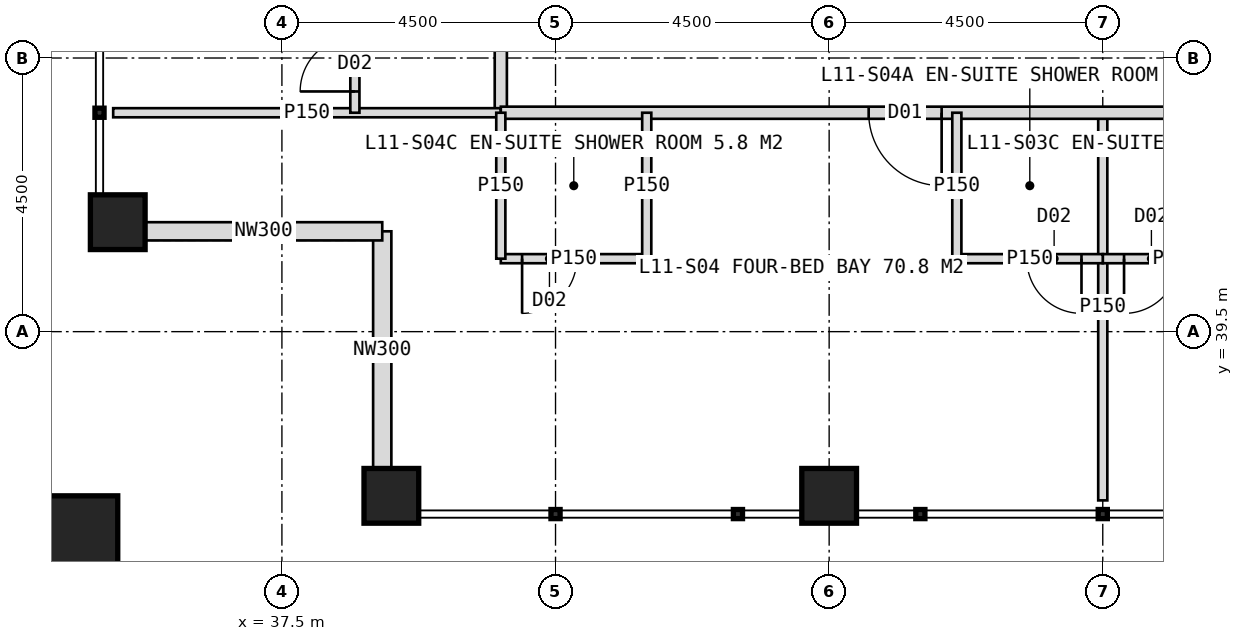
"""IFC4 building model, lengths in metres.
Left out: names, types, materials, properties, quantities, classifications, styles, units other than length and angle.
Written with IfcOpenShell. Run it as: python <this file> out.ifc"""

import sys

from ifc_helpers import new_model, si_unit, direction, frame, frame_2d, origin, origin_2d, place, context, subcontext, project, spatial, rectangle, hollow_rectangle, extrude, element, fill, save


model = new_model("IFC4")
c1 = context("Model", 3, precision=1e-05, world=origin(), true_north=direction((0.0, 1.0)))
c2 = subcontext(c1, "Body", "Model", "MODEL_VIEW")
j1 = project(units=[si_unit("LENGTHUNIT", "METRE"), si_unit("PLANEANGLEUNIT", "RADIAN")], contexts=[c1])
p1 = place(None, origin())
s1 = spatial("IfcSite", under=j1, at=p1, CompositionType="ELEMENT")
p2 = place(p1, origin())
s2 = spatial("IfcBuilding", under=s1, at=p2, CompositionType="ELEMENT")
p3 = place(p2, frame((0.0, 0.0, 51.0)))
s3 = spatial("IfcBuildingStorey", under=s2, at=p3, CompositionType="ELEMENT", Elevation=51.0)
for number, where, z_axis, x_axis in (
    (1, (39.3, 36.8, 0.0), (0.0, 0.0, 1.0), (1.0, 0.0, 0.0)),
    (2, (34.8, 41.3, 0.0), (0.0, 0.0, 1.0), (1.0, 0.0, 0.0)),
    (3, (46.5, 36.8, 0.0), (0.0, 0.0, 1.0), (1.0, 0.0, 0.0)),
):
    element("IfcColumn", number, at=place(p3, frame(where, z_axis=z_axis, x_axis=x_axis)), inside=s3, PredefinedType="COLUMN", context=c2, shape_type="SweptSolid", body=[
        extrude(hollow_rectangle(XDim=0.9, YDim=0.9, WallThickness=0.08, at=origin_2d()), origin(), (0.0, 0.0, 1.0), 4.0),
    ])
p4 = place(p3, frame((33.9, 35.9, 0.0), z_axis=(0.0, 0.0, 1.0), x_axis=(1.0, 0.0, 0.0)))
e4 = element("IfcColumn", 4, at=p4, inside=s3, PredefinedType="COLUMN", context=c2, shape_type="SweptSolid", body=[
    extrude(hollow_rectangle(XDim=1.8, YDim=1.8, WallThickness=0.1, at=origin_2d()), origin(), (0.0, 0.0, 1.0), 4.0),
])
for number, where, z_axis, x_axis in (
    (5, (39.15, 37.25, 0.0), (0.0, 0.0, 1.0), (0.0, 1.0, 0.0)),
    (6, (39.15, 41.15, 0.0), (0.0, 0.0, 1.0), (-1.0, 0.0, 0.0)),
):
    element("IfcWall", number, at=place(p3, frame(where, z_axis=z_axis, x_axis=x_axis)), inside=s3, PredefinedType="ELEMENTEDWALL", context=c2, shape_type="SweptSolid", body=[
        extrude(rectangle(XDim=3.9, YDim=0.3, at=frame_2d((1.95, 0.0))), origin(), (0.0, 0.0, 1.0), 2.95),
    ])
p5 = place(p3, frame((41.1, 43.1, 0.0), z_axis=(0.0, 0.0, 1.0), x_axis=(0.0, 1.0, 0.0)))
e7 = element("IfcWall", 7, at=p5, inside=s3, PredefinedType="PARTITIONING", context=c2, shape_type="SweptSolid", body=[
    extrude(rectangle(XDim=37.8, YDim=0.2, at=frame_2d((18.9, 0.0))), origin(), (0.0, 0.0, 1.0), 3.75),
])
p6 = place(p5, frame((3.25, 0.0, 0.0)))
e8 = element("IfcOpeningElement", 8, at=p6, cuts=e7, PredefinedType="OPENING", context=c2, shape_type="SweptSolid", body=[
    extrude(rectangle(XDim=1.2, YDim=2.2, at=frame_2d((0.6, 1.1))), frame((0.0, 0.11, 0.0), z_axis=(0.0, -1.0, 0.0), x_axis=(1.0, 0.0, 0.0)), (0.0, 0.0, 1.0), 0.22),
])
p7 = place(p5, frame((9.55, 0.0, 0.0)))
e9 = element("IfcOpeningElement", 9, at=p7, cuts=e7, PredefinedType="OPENING", context=c2, shape_type="SweptSolid", body=[
    extrude(rectangle(XDim=1.2, YDim=2.2, at=frame_2d((0.6, 1.1))), frame((0.0, 0.11, 0.0), z_axis=(0.0, -1.0, 0.0), x_axis=(1.0, 0.0, 0.0)), (0.0, 0.0, 1.0), 0.22),
])
p8 = place(p5, frame((15.55, 0.0, 0.0)))
e10 = element("IfcOpeningElement", 10, at=p8, cuts=e7, PredefinedType="OPENING", context=c2, shape_type="SweptSolid", body=[
    extrude(rectangle(XDim=1.2, YDim=2.2, at=frame_2d((0.6, 1.1))), frame((0.0, 0.11, 0.0), z_axis=(0.0, -1.0, 0.0), x_axis=(1.0, 0.0, 0.0)), (0.0, 0.0, 1.0), 0.22),
])
p9 = place(p5, frame((21.55, 0.0, 0.0)))
e11 = element("IfcOpeningElement", 11, at=p9, cuts=e7, PredefinedType="OPENING", context=c2, shape_type="SweptSolid", body=[
    extrude(rectangle(XDim=1.2, YDim=2.2, at=frame_2d((0.6, 1.1))), frame((0.0, 0.11, 0.0), z_axis=(0.0, -1.0, 0.0), x_axis=(1.0, 0.0, 0.0)), (0.0, 0.0, 1.0), 0.22),
])
p10 = place(p5, frame((27.55, 0.0, 0.0)))
e12 = element("IfcOpeningElement", 12, at=p10, cuts=e7, PredefinedType="OPENING", context=c2, shape_type="SweptSolid", body=[
    extrude(rectangle(XDim=1.2, YDim=2.2, at=frame_2d((0.6, 1.1))), frame((0.0, 0.11, 0.0), z_axis=(0.0, -1.0, 0.0), x_axis=(1.0, 0.0, 0.0)), (0.0, 0.0, 1.0), 0.22),
])
p11 = place(p3, frame((41.1, 43.1, 0.0), z_axis=(0.0, 0.0, 1.0), x_axis=(-1.0, 0.0, 0.0)))
e13 = element("IfcWall", 13, at=p11, inside=s3, PredefinedType="PARTITIONING", context=c2, shape_type="SweptSolid", body=[
    extrude(rectangle(XDim=6.375, YDim=0.15, at=frame_2d((3.188, 0.0))), origin(), (0.0, 0.0, 1.0), 3.75),
])
p12 = place(p3, frame((38.7, 43.1, 0.0), z_axis=(0.0, 0.0, 1.0), x_axis=(0.0, 1.0, 0.0)))
e14 = element("IfcWall", 14, at=p12, inside=s3, PredefinedType="PARTITIONING", context=c2, shape_type="SweptSolid", body=[
    extrude(rectangle(XDim=3.0, YDim=0.15, at=frame_2d((1.5, 0.0))), origin(), (0.0, 0.0, 1.0), 3.75),
])
p13 = place(p12, frame((0.35, 0.0, 0.0)))
e15 = element("IfcOpeningElement", 15, at=p13, cuts=e14, PredefinedType="OPENING", context=c2, shape_type="SweptSolid", body=[
    extrude(rectangle(XDim=0.9, YDim=2.1, at=frame_2d((0.45, 1.05))), frame((0.0, 0.085, 0.0), z_axis=(0.0, -1.0, 0.0), x_axis=(1.0, 0.0, 0.0)), (0.0, 0.0, 1.0), 0.17),
])
p14 = place(p3, frame((51.0, 43.1, 0.0), z_axis=(0.0, 0.0, 1.0), x_axis=(0.0, -1.0, 0.0)))
e16 = element("IfcWall", 16, at=p14, inside=s3, PredefinedType="PARTITIONING", context=c2, shape_type="SweptSolid", body=[
    extrude(rectangle(XDim=6.375, YDim=0.15, at=frame_2d((3.188, 0.0))), origin(), (0.0, 0.0, 1.0), 3.75),
])
p15 = place(p3, frame((78.9, 43.1, 0.0), z_axis=(0.0, 0.0, 1.0), x_axis=(-1.0, 0.0, 0.0)))
e17 = element("IfcWall", 17, at=p15, inside=s3, PredefinedType="PARTITIONING", context=c2, shape_type="SweptSolid", body=[
    extrude(rectangle(XDim=37.8, YDim=0.2, at=frame_2d((18.9, 0.0))), origin(), (0.0, 0.0, 1.0), 3.75),
])
p16 = place(p15, frame((2.65, 0.0, 0.0)))
e18 = element("IfcOpeningElement", 18, at=p16, cuts=e17, PredefinedType="OPENING", context=c2, shape_type="SweptSolid", body=[
    extrude(rectangle(XDim=1.2, YDim=2.2, at=frame_2d((0.6, 1.1))), frame((0.0, 0.11, 0.0), z_axis=(0.0, -1.0, 0.0), x_axis=(1.0, 0.0, 0.0)), (0.0, 0.0, 1.0), 0.22),
])
p17 = place(p15, frame((12.55, 0.0, 0.0)))
e19 = element("IfcOpeningElement", 19, at=p17, cuts=e17, PredefinedType="OPENING", context=c2, shape_type="SweptSolid", body=[
    extrude(rectangle(XDim=1.2, YDim=2.2, at=frame_2d((0.6, 1.1))), frame((0.0, 0.11, 0.0), z_axis=(0.0, -1.0, 0.0), x_axis=(1.0, 0.0, 0.0)), (0.0, 0.0, 1.0), 0.22),
])
p18 = place(p15, frame((21.55, 0.0, 0.0)))
e20 = element("IfcOpeningElement", 20, at=p18, cuts=e17, PredefinedType="OPENING", context=c2, shape_type="SweptSolid", body=[
    extrude(rectangle(XDim=1.2, YDim=2.2, at=frame_2d((0.6, 1.1))), frame((0.0, 0.11, 0.0), z_axis=(0.0, -1.0, 0.0), x_axis=(1.0, 0.0, 0.0)), (0.0, 0.0, 1.0), 0.22),
])
p19 = place(p15, frame((30.55, 0.0, 0.0)))
e21 = element("IfcOpeningElement", 21, at=p19, cuts=e17, PredefinedType="OPENING", context=c2, shape_type="SweptSolid", body=[
    extrude(rectangle(XDim=1.2, YDim=2.2, at=frame_2d((0.6, 1.1))), frame((0.0, 0.11, 0.0), z_axis=(0.0, -1.0, 0.0), x_axis=(1.0, 0.0, 0.0)), (0.0, 0.0, 1.0), 0.22),
])
p20 = place(p3, frame((53.4, 40.7, 0.0), z_axis=(0.0, 0.0, 1.0), x_axis=(-1.0, 0.0, 0.0)))
e22 = element("IfcWall", 22, at=p20, inside=s3, PredefinedType="PARTITIONING", context=c2, shape_type="SweptSolid", body=[
    extrude(rectangle(XDim=2.4, YDim=0.15, at=frame_2d((1.2, 0.0))), origin(), (0.0, 0.0, 1.0), 3.75),
])
p21 = place(p20, frame((1.15, 0.0, 0.0)))
e23 = element("IfcOpeningElement", 23, at=p21, cuts=e22, PredefinedType="OPENING", context=c2, shape_type="SweptSolid", body=[
    extrude(rectangle(XDim=0.9, YDim=2.1, at=frame_2d((0.45, 1.05))), frame((0.0, 0.085, 0.0), z_axis=(0.0, -1.0, 0.0), x_axis=(1.0, 0.0, 0.0)), (0.0, 0.0, 1.0), 0.17),
])
p22 = place(p3, frame((51.0, 40.7, 0.0), z_axis=(0.0, 0.0, 1.0), x_axis=(-1.0, 0.0, 0.0)))
e24 = element("IfcWall", 24, at=p22, inside=s3, PredefinedType="PARTITIONING", context=c2, shape_type="SweptSolid", body=[
    extrude(rectangle(XDim=2.4, YDim=0.15, at=frame_2d((1.2, 0.0))), origin(), (0.0, 0.0, 1.0), 3.75),
])
p23 = place(p22, frame((0.35, 0.0, 0.0)))
e25 = element("IfcOpeningElement", 25, at=p23, cuts=e24, PredefinedType="OPENING", context=c2, shape_type="SweptSolid", body=[
    extrude(rectangle(XDim=0.9, YDim=2.1, at=frame_2d((0.45, 1.05))), frame((0.0, 0.085, 0.0), z_axis=(0.0, -1.0, 0.0), x_axis=(1.0, 0.0, 0.0)), (0.0, 0.0, 1.0), 0.17),
])
p24 = place(p3, frame((48.6, 43.1, 0.0), z_axis=(0.0, 0.0, 1.0), x_axis=(0.0, -1.0, 0.0)))
e26 = element("IfcWall", 26, at=p24, inside=s3, PredefinedType="PARTITIONING", context=c2, shape_type="SweptSolid", body=[
    extrude(rectangle(XDim=2.4, YDim=0.15, at=frame_2d((1.2, 0.0))), origin(), (0.0, 0.0, 1.0), 3.75),
])
p25 = place(p3, frame((43.5, 40.7, 0.0), z_axis=(0.0, 0.0, 1.0), x_axis=(-1.0, 0.0, 0.0)))
e27 = element("IfcWall", 27, at=p25, inside=s3, PredefinedType="PARTITIONING", context=c2, shape_type="SweptSolid", body=[
    extrude(rectangle(XDim=2.4, YDim=0.15, at=frame_2d((1.2, 0.0))), origin(), (0.0, 0.0, 1.0), 3.75),
])
p26 = place(p25, frame((1.15, 0.0, 0.0)))
e28 = element("IfcOpeningElement", 28, at=p26, cuts=e27, PredefinedType="OPENING", context=c2, shape_type="SweptSolid", body=[
    extrude(rectangle(XDim=0.9, YDim=2.1, at=frame_2d((0.45, 1.05))), frame((0.0, 0.085, 0.0), z_axis=(0.0, -1.0, 0.0), x_axis=(1.0, 0.0, 0.0)), (0.0, 0.0, 1.0), 0.17),
])
for number, where, z_axis, x_axis in (
    (29, (43.5, 43.1, 0.0), (0.0, 0.0, 1.0), (0.0, -1.0, 0.0)),
    (30, (41.1, 43.1, 0.0), (0.0, 0.0, 1.0), (0.0, -1.0, 0.0)),
):
    element("IfcWall", number, at=place(p3, frame(where, z_axis=z_axis, x_axis=x_axis)), inside=s3, PredefinedType="PARTITIONING", context=c2, shape_type="SweptSolid", body=[
        extrude(rectangle(XDim=2.4, YDim=0.15, at=frame_2d((1.2, 0.0))), origin(), (0.0, 0.0, 1.0), 3.75),
    ])
p27 = place(p13, origin())
e31 = element("IfcDoor", 31, at=p27, inside=s3, OperationType="SINGLE_SWING_LEFT", PredefinedType="DOOR", context=c2, shape_type="SweptSolid", body=[
    extrude(rectangle(XDim=0.9, YDim=2.1, at=frame_2d((0.45, 1.05))), frame((0.0, 0.025, 0.0), z_axis=(0.0, -1.0, 0.0), x_axis=(1.0, 0.0, 0.0)), (0.0, 0.0, 1.0), 0.05),
])
fill(e15, e31)
p28 = place(p21, origin())
e32 = element("IfcDoor", 32, at=p28, inside=s3, OperationType="SINGLE_SWING_RIGHT", PredefinedType="DOOR", context=c2, shape_type="SweptSolid", body=[
    extrude(rectangle(XDim=0.9, YDim=2.1, at=frame_2d((0.45, 1.05))), frame((0.0, 0.025, 0.0), z_axis=(0.0, -1.0, 0.0), x_axis=(1.0, 0.0, 0.0)), (0.0, 0.0, 1.0), 0.05),
])
fill(e23, e32)
p29 = place(p19, origin())
e33 = element("IfcDoor", 33, at=p29, inside=s3, OperationType="SINGLE_SWING_LEFT", PredefinedType="DOOR", context=c2, shape_type="SweptSolid", body=[
    extrude(rectangle(XDim=1.2, YDim=2.2, at=frame_2d((0.6, 1.1))), frame((0.0, 0.025, 0.0), z_axis=(0.0, -1.0, 0.0), x_axis=(1.0, 0.0, 0.0)), (0.0, 0.0, 1.0), 0.05),
])
fill(e21, e33)
p30 = place(p23, origin())
e34 = element("IfcDoor", 34, at=p30, inside=s3, OperationType="SINGLE_SWING_LEFT", PredefinedType="DOOR", context=c2, shape_type="SweptSolid", body=[
    extrude(rectangle(XDim=0.9, YDim=2.1, at=frame_2d((0.45, 1.05))), frame((0.0, 0.025, 0.0), z_axis=(0.0, -1.0, 0.0), x_axis=(1.0, 0.0, 0.0)), (0.0, 0.0, 1.0), 0.05),
])
fill(e25, e34)
p31 = place(p26, origin())
e35 = element("IfcDoor", 35, at=p31, inside=s3, OperationType="SINGLE_SWING_RIGHT", PredefinedType="DOOR", context=c2, shape_type="SweptSolid", body=[
    extrude(rectangle(XDim=0.9, YDim=2.1, at=frame_2d((0.45, 1.05))), frame((0.0, 0.025, 0.0), z_axis=(0.0, -1.0, 0.0), x_axis=(1.0, 0.0, 0.0)), (0.0, 0.0, 1.0), 0.05),
])
fill(e28, e35)
save(model, sys.argv[1])
